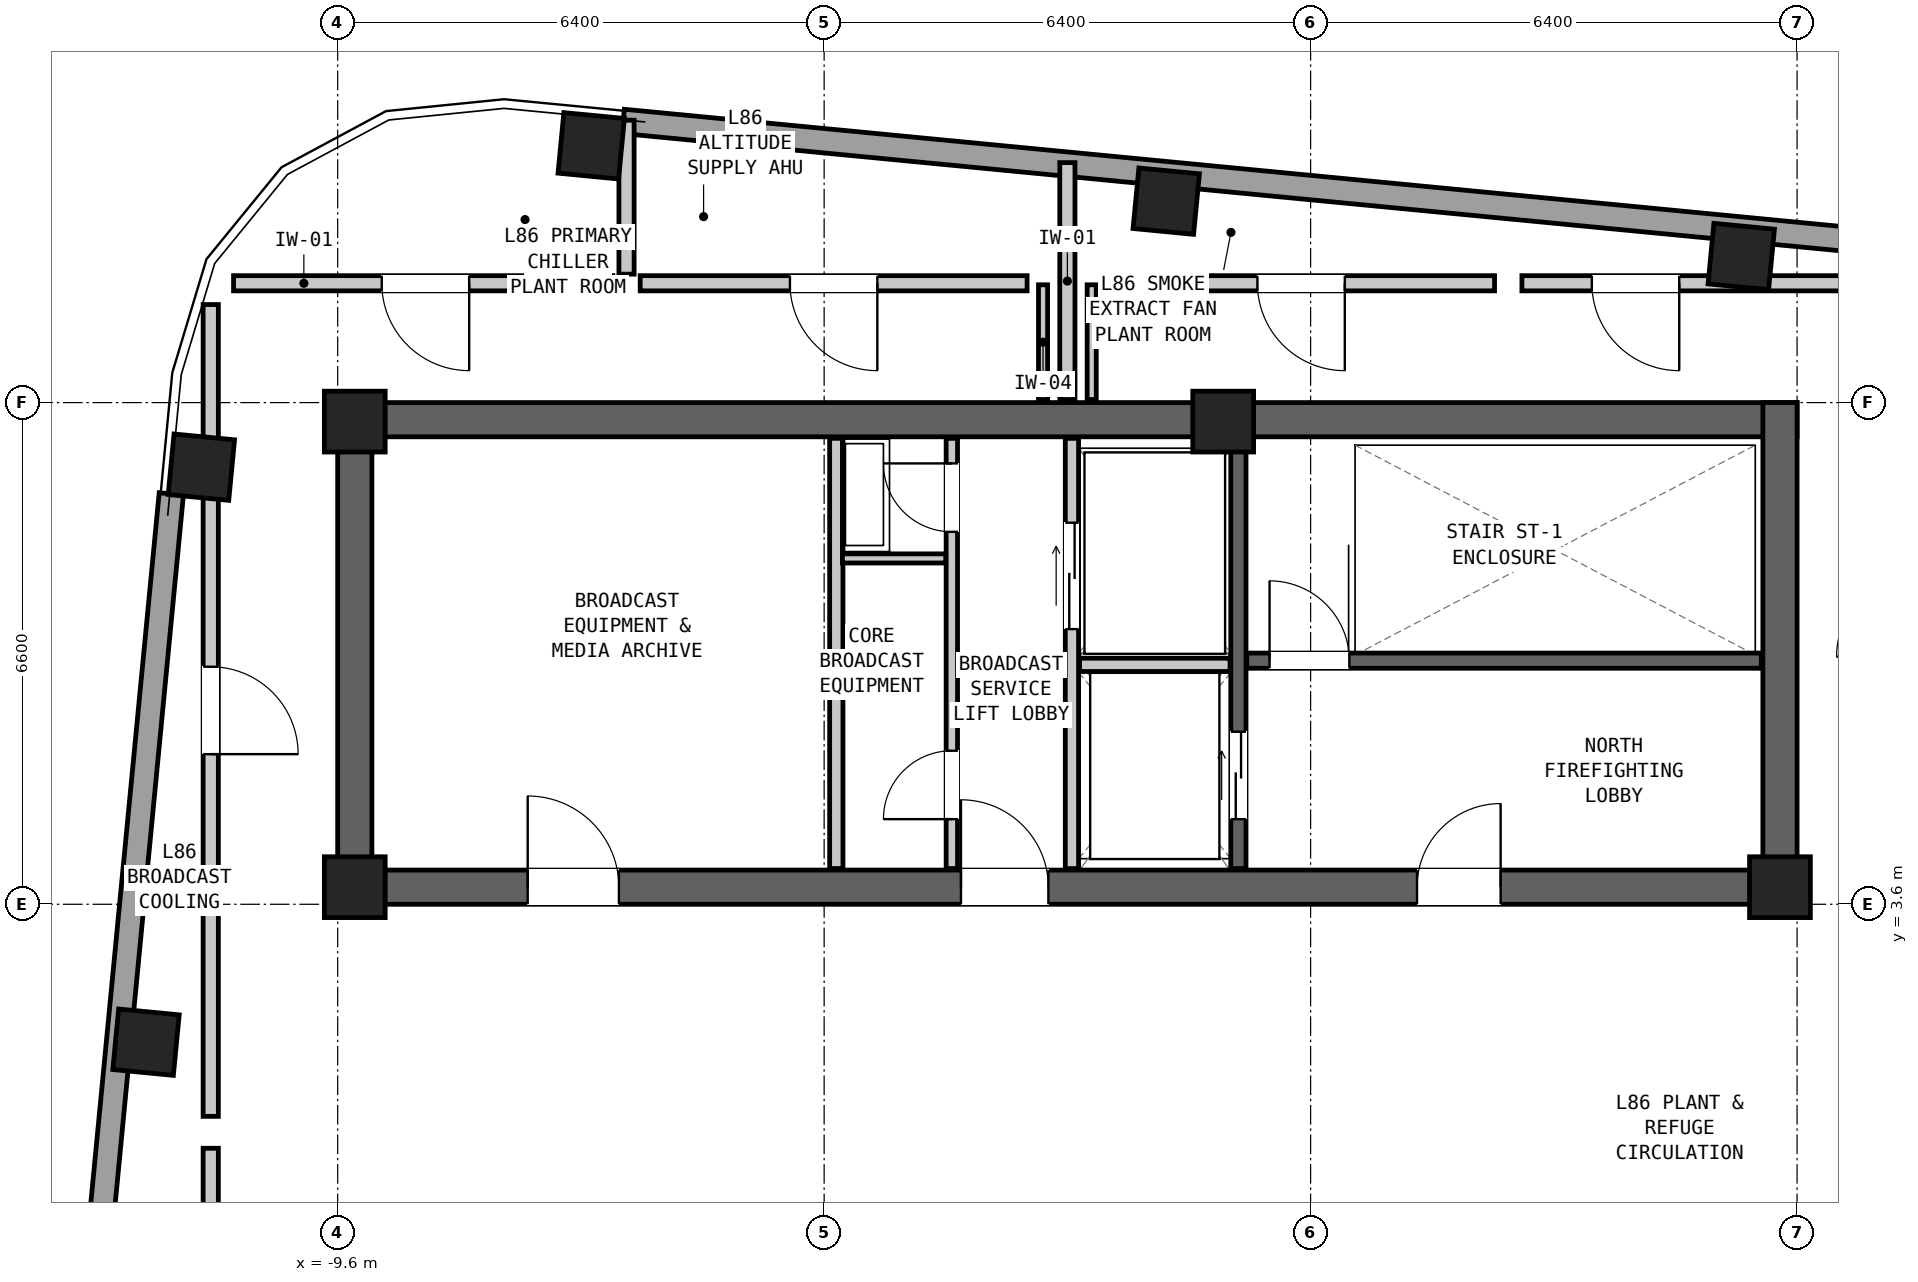
"""IFC4 building model, lengths in metres.
Left out: names, types, materials, properties, quantities, classifications, styles, units other than length and angle.
Written with IfcOpenShell. Run it as: python <this file> out.ifc"""

import sys

from ifc_helpers import new_model, si_unit, direction, frame, frame_2d, origin, origin_2d, place, context, subcontext, project, spatial, rectangle, extrude, element, fill, save


model = new_model("IFC4")
c1 = context("Model", 3, precision=1e-05, world=origin(), true_north=direction((0.0, 1.0)))
c2 = subcontext(c1, "Body", "Model", "MODEL_VIEW")
j1 = project(units=[si_unit("LENGTHUNIT", "METRE"), si_unit("PLANEANGLEUNIT", "RADIAN")], contexts=[c1])
p1 = place(None, origin())
s1 = spatial("IfcSite", under=j1, at=p1, CompositionType="ELEMENT")
p2 = place(p1, origin())
s2 = spatial("IfcBuilding", under=s1, at=p2, CompositionType="ELEMENT")
p3 = place(p2, frame((0.0, 0.0, 292.85)))
s3 = spatial("IfcBuildingStorey", under=s2, at=p3, CompositionType="ELEMENT", Elevation=292.85)
p4 = place(p3, frame((-9.6, 9.975, 0.0), z_axis=(0.0, 0.0, 1.0), x_axis=(1.0, 0.0, 0.0)))
e1 = element("IfcWall", 1, at=p4, inside=s3, PredefinedType="SHEAR", context=c2, shape_type="SweptSolid", body=[
    extrude(rectangle(XDim=19.2, YDim=0.45, at=frame_2d((9.6, 0.0))), origin(), (0.0, 0.0, 1.0), 3.9),
])
p5 = place(p3, frame((-9.6, 3.825, 0.0), z_axis=(0.0, 0.0, 1.0), x_axis=(1.0, 0.0, 0.0)))
e2 = element("IfcWall", 2, at=p5, inside=s3, PredefinedType="SHEAR", context=c2, shape_type="SweptSolid", body=[
    extrude(rectangle(XDim=19.2, YDim=0.45, at=frame_2d((9.6, 0.0))), origin(), (0.0, 0.0, 1.0), 3.9),
])
p6 = place(p5, frame((14.2, 0.0, 0.0)))
e3 = element("IfcOpeningElement", 3, at=p6, cuts=e2, PredefinedType="OPENING", context=c2, shape_type="SweptSolid", body=[
    extrude(rectangle(XDim=1.1, YDim=2.08, at=frame_2d((0.55, 1.04))), frame((0.0, 0.237, 0.0), z_axis=(0.0, -1.0, 0.0), x_axis=(1.0, 0.0, 0.0)), (0.0, 0.0, 1.0), 0.474),
])
p7 = place(p5, frame((8.2, 0.0, 0.0)))
e4 = element("IfcOpeningElement", 4, at=p7, cuts=e2, PredefinedType="OPENING", context=c2, shape_type="SweptSolid", body=[
    extrude(rectangle(XDim=1.15, YDim=2.1, at=frame_2d((0.575, 1.05))), frame((0.0, 0.237, 0.0), z_axis=(0.0, -1.0, 0.0), x_axis=(1.0, 0.0, 0.0)), (0.0, 0.0, 1.0), 0.474),
])
p8 = place(p5, frame((2.5, 0.0, 0.0)))
e5 = element("IfcOpeningElement", 5, at=p8, cuts=e2, PredefinedType="OPENING", context=c2, shape_type="SweptSolid", body=[
    extrude(rectangle(XDim=1.2, YDim=2.1, at=frame_2d((0.6, 1.05))), frame((0.0, 0.237, 0.0), z_axis=(0.0, -1.0, 0.0), x_axis=(1.0, 0.0, 0.0)), (0.0, 0.0, 1.0), 0.474),
])
for number, where, z_axis, x_axis in (
    (6, (-9.375, 3.6, 0.0), (0.0, 0.0, 1.0), (0.0, 1.0, 0.0)),
    (7, (9.375, 3.6, 0.0), (0.0, 0.0, 1.0), (0.0, 1.0, 0.0)),
):
    element("IfcWall", number, at=place(p3, frame(where, z_axis=z_axis, x_axis=x_axis)), inside=s3, PredefinedType="SHEAR", context=c2, shape_type="SweptSolid", body=[
        extrude(rectangle(XDim=6.6, YDim=0.45, at=frame_2d((3.3, 0.0))), origin(), (0.0, 0.0, 1.0), 3.9),
    ])
for number, where, z_axis, x_axis in (
    (8, (8.865, 12.122, 0.0), (0.0, 0.0, 1.0), (0.995, -0.096, 0.0)),
    (9, (1.301, 12.85, 0.0), (0.0, 0.0, 1.0), (0.995, -0.096, 0.0)),
    (10, (-6.264, 13.579, 0.0), (0.0, 0.0, 1.0), (0.995, -0.096, 0.0)),
    (11, (-11.393, 9.351, 0.0), (0.0, 0.0, 1.0), (0.096, 0.995, 0.0)),
    (12, (-12.122, 1.786, 0.0), (0.0, 0.0, 1.0), (0.096, 0.995, 0.0)),
    (13, (-9.375, 9.95, 0.0), (0.0, 0.0, 1.0), (1.0, 0.0, 0.0)),
    (14, (2.05, 9.95, 0.0), (0.0, 0.0, 1.0), (1.0, 0.0, 0.0)),
    (15, (-9.375, 3.825, 0.0), (0.0, 0.0, 1.0), (1.0, 0.0, 0.0)),
    (16, (9.375, 3.825, 0.0), (0.0, 0.0, 1.0), (1.0, 0.0, 0.0)),
):
    element("IfcColumn", number, at=place(p3, frame(where, z_axis=z_axis, x_axis=x_axis)), inside=s3, PredefinedType="COLUMN", context=c2, shape_type="SweptSolid", body=[
        extrude(rectangle(XDim=0.8, YDim=0.8, at=origin_2d()), origin(), (0.0, 0.0, 1.0), 3.9),
    ])
p9 = place(p3, frame((-5.844, 13.9, 0.0), z_axis=(0.0, 0.0, 1.0), x_axis=(0.995396489284, -0.095842731181, 0.0)))
e17 = element("IfcWall", 17, at=p9, inside=s3, PredefinedType="SOLIDWALL", context=c2, shape_type="SweptSolid", body=[
    extrude(rectangle(XDim=22.024, YDim=0.32, at=frame_2d((11.012, 0.0))), origin(), (0.0, 0.0, 1.0), 3.214),
])
p10 = place(p3, frame((-13.9, -12.924, 0.0), z_axis=(0.0, 0.0, 1.0), x_axis=(0.095843788738, 0.995396387456, 0.0)))
e18 = element("IfcWall", 18, at=p10, inside=s3, PredefinedType="SOLIDWALL", context=c2, shape_type="SweptSolid", body=[
    extrude(rectangle(XDim=22.024, YDim=0.32, at=frame_2d((11.012, 0.0))), origin(), (0.0, 0.0, 1.0), 3.214),
])
p11 = place(p3, frame((2.36, 6.805, 0.0), z_axis=(0.0, 0.0, 1.0), x_axis=(1.0, 0.0, 0.0)))
e19 = element("IfcWall", 19, at=p11, inside=s3, PredefinedType="SHEAR", context=c2, shape_type="SweptSolid", body=[
    extrude(rectangle(XDim=6.77, YDim=0.2, at=frame_2d((3.385, 0.0))), origin(), (0.0, 0.0, 1.0), 3.64),
])
p12 = place(p11, frame((0.3, 0.0, 0.0)))
e20 = element("IfcOpeningElement", 20, at=p12, cuts=e19, PredefinedType="OPENING", context=c2, shape_type="SweptSolid", body=[
    extrude(rectangle(XDim=1.05, YDim=2.08, at=frame_2d((0.525, 1.04))), frame((0.0, 0.112, 0.0), z_axis=(0.0, -1.0, 0.0), x_axis=(1.0, 0.0, 0.0)), (0.0, 0.0, 1.0), 0.224),
])
p13 = place(p3, frame((2.25, 4.07, 0.0), z_axis=(0.0, 0.0, 1.0), x_axis=(0.0, 1.0, 0.0)))
e21 = element("IfcWall", 21, at=p13, inside=s3, PredefinedType="SHEAR", context=c2, shape_type="SweptSolid", body=[
    extrude(rectangle(XDim=5.66, YDim=0.2, at=frame_2d((2.83, 0.0))), origin(), (0.0, 0.0, 1.0), 3.64),
])
p14 = place(p13, frame((0.65, 0.0, 0.0)))
e22 = element("IfcOpeningElement", 22, at=p14, cuts=e21, PredefinedType="OPENING", context=c2, shape_type="SweptSolid", body=[
    extrude(rectangle(XDim=1.15, YDim=2.08, at=frame_2d((0.575, 1.04))), frame((0.0, 0.112, 0.0), z_axis=(0.0, -1.0, 0.0), x_axis=(1.0, 0.0, 0.0)), (0.0, 0.0, 1.0), 0.224),
])
p15 = place(p3, frame((0.06, 4.07, 0.0), z_axis=(0.0, 0.0, 1.0), x_axis=(0.0, 1.0, 0.0)))
e23 = element("IfcWall", 23, at=p15, inside=s3, PredefinedType="PARTITIONING", context=c2, shape_type="SweptSolid", body=[
    extrude(rectangle(XDim=5.66, YDim=0.175, at=frame_2d((2.83, 0.0))), origin(), (0.0, 0.0, 1.0), 3.64),
])
p16 = place(p15, frame((3.15, 0.0, 0.0)))
e24 = element("IfcOpeningElement", 24, at=p16, cuts=e23, PredefinedType="OPENING", context=c2, shape_type="SweptSolid", body=[
    extrude(rectangle(XDim=1.4, YDim=2.12, at=frame_2d((0.7, 1.06))), frame((0.0, 0.1, 0.0), z_axis=(0.0, -1.0, 0.0), x_axis=(1.0, 0.0, 0.0)), (0.0, 0.0, 1.0), 0.199),
])
p17 = place(p3, frame((0.16, 6.75, 0.0), z_axis=(0.0, 0.0, 1.0), x_axis=(1.0, 0.0, 0.0)))
e25 = element("IfcWall", 25, at=p17, inside=s3, PredefinedType="PARTITIONING", context=c2, shape_type="SweptSolid", body=[
    extrude(rectangle(XDim=1.98, YDim=0.175, at=frame_2d((0.99, 0.0))), origin(), (0.0, 0.0, 1.0), 3.64),
])
p18 = place(p3, frame((-3.04, 4.07, 0.0), z_axis=(0.0, 0.0, 1.0), x_axis=(0.0, 1.0, 0.0)))
e26 = element("IfcWall", 26, at=p18, inside=s3, PredefinedType="PARTITIONING", context=c2, shape_type="SweptSolid", body=[
    extrude(rectangle(XDim=5.66, YDim=0.175, at=frame_2d((2.83, 0.0))), origin(), (0.0, 0.0, 1.0), 3.64),
])
p19 = place(p3, frame((-1.52, 4.07, 0.0), z_axis=(0.0, 0.0, 1.0), x_axis=(0.0, 1.0, 0.0)))
e27 = element("IfcWall", 27, at=p19, inside=s3, PredefinedType="PARTITIONING", context=c2, shape_type="SweptSolid", body=[
    extrude(rectangle(XDim=5.66, YDim=0.15, at=frame_2d((2.83, 0.0))), origin(), (0.0, 0.0, 1.0), 3.64),
])
p20 = place(p19, frame((4.43, 0.0, 0.0)))
e28 = element("IfcOpeningElement", 28, at=p20, cuts=e27, PredefinedType="OPENING", context=c2, shape_type="SweptSolid", body=[
    extrude(rectangle(XDim=0.9, YDim=2.05, at=frame_2d((0.45, 1.025))), frame((0.0, 0.087, 0.0), z_axis=(0.0, -1.0, 0.0), x_axis=(1.0, 0.0, 0.0)), (0.0, 0.0, 1.0), 0.174),
])
p21 = place(p19, frame((0.65, 0.0, 0.0)))
e29 = element("IfcOpeningElement", 29, at=p21, cuts=e27, PredefinedType="OPENING", context=c2, shape_type="SweptSolid", body=[
    extrude(rectangle(XDim=0.9, YDim=2.05, at=frame_2d((0.45, 1.025))), frame((0.0, 0.087, 0.0), z_axis=(0.0, -1.0, 0.0), x_axis=(1.0, 0.0, 0.0)), (0.0, 0.0, 1.0), 0.174),
])
p22 = place(p3, frame((-2.96, 8.15, 0.0), z_axis=(0.0, 0.0, 1.0), x_axis=(1.0, 0.0, 0.0)))
e30 = element("IfcWall", 30, at=p22, inside=s3, PredefinedType="PARTITIONING", context=c2, shape_type="SweptSolid", body=[
    extrude(rectangle(XDim=1.36, YDim=0.12, at=frame_2d((0.68, 0.0))), origin(), (0.0, 0.0, 1.0), 3.64),
])
p23 = place(p3, frame((0.0, 10.24, 0.0), z_axis=(0.0, 0.0, 1.0), x_axis=(0.0, 1.0, 0.0)))
e31 = element("IfcWall", 31, at=p23, inside=s3, PredefinedType="PARTITIONING", context=c2, shape_type="SweptSolid", body=[
    extrude(rectangle(XDim=3.117, YDim=0.2, at=frame_2d((1.559, 0.0))), origin(), (0.0, 0.0, 1.0), 3.161),
])
for number, where, z_axis, x_axis in (
    (32, (-0.32, 10.24, 0.0), (0.0, 0.0, 1.0), (0.0, 1.0, 0.0)),
    (33, (0.32, 10.24, 0.0), (0.0, 0.0, 1.0), (0.0, 1.0, 0.0)),
):
    element("IfcWall", number, at=place(p3, frame(where, z_axis=z_axis, x_axis=x_axis)), inside=s3, PredefinedType="PARTITIONING", context=c2, shape_type="SweptSolid", body=[
        extrude(rectangle(XDim=1.51, YDim=0.12, at=frame_2d((0.755, 0.0))), origin(), (0.0, 0.0, 1.0), 3.161),
    ])
p24 = place(p3, frame((-5.98, 11.77, 0.0), z_axis=(0.0, 0.0, 1.0), x_axis=(-1.0, 0.0, 0.0)))
e34 = element("IfcWall", 34, at=p24, inside=s3, PredefinedType="PARTITIONING", context=c2, shape_type="SweptSolid", body=[
    extrude(rectangle(XDim=4.99, YDim=0.2, at=frame_2d((2.495, 0.0))), origin(), (0.0, 0.0, 1.0), 3.64),
])
p25 = place(p24, frame((1.89, 0.0, 0.0)))
e35 = element("IfcOpeningElement", 35, at=p25, cuts=e34, PredefinedType="OPENING", context=c2, shape_type="SweptSolid", body=[
    extrude(rectangle(XDim=1.15, YDim=2.1, at=frame_2d((0.575, 1.05))), frame((0.0, 0.112, 0.0), z_axis=(0.0, -1.0, 0.0), x_axis=(1.0, 0.0, 0.0)), (0.0, 0.0, 1.0), 0.224),
])
p26 = place(p3, frame((-5.8, 11.89, 0.0), z_axis=(0.0, 0.0, 1.0), x_axis=(0.0, 1.0, 0.0)))
e36 = element("IfcWall", 36, at=p26, inside=s3, PredefinedType="PARTITIONING", context=c2, shape_type="SweptSolid", body=[
    extrude(rectangle(XDim=2.026, YDim=0.2, at=frame_2d((1.013, 0.0))), origin(), (0.0, 0.0, 1.0), 3.161),
])
p27 = place(p3, frame((-0.53, 11.77, 0.0), z_axis=(0.0, 0.0, 1.0), x_axis=(-1.0, 0.0, 0.0)))
e37 = element("IfcWall", 37, at=p27, inside=s3, PredefinedType="PARTITIONING", context=c2, shape_type="SweptSolid", body=[
    extrude(rectangle(XDim=5.09, YDim=0.2, at=frame_2d((2.545, 0.0))), origin(), (0.0, 0.0, 1.0), 3.64),
])
p28 = place(p27, frame((1.97, 0.0, 0.0)))
e38 = element("IfcOpeningElement", 38, at=p28, cuts=e37, PredefinedType="OPENING", context=c2, shape_type="SweptSolid", body=[
    extrude(rectangle(XDim=1.15, YDim=2.1, at=frame_2d((0.575, 1.05))), frame((0.0, 0.112, 0.0), z_axis=(0.0, -1.0, 0.0), x_axis=(1.0, 0.0, 0.0)), (0.0, 0.0, 1.0), 0.224),
])
p29 = place(p3, frame((5.62, 11.77, 0.0), z_axis=(0.0, 0.0, 1.0), x_axis=(-1.0, 0.0, 0.0)))
e39 = element("IfcWall", 39, at=p29, inside=s3, PredefinedType="PARTITIONING", context=c2, shape_type="SweptSolid", body=[
    extrude(rectangle(XDim=5.09, YDim=0.2, at=frame_2d((2.545, 0.0))), origin(), (0.0, 0.0, 1.0), 3.64),
])
p30 = place(p29, frame((1.97, 0.0, 0.0)))
e40 = element("IfcOpeningElement", 40, at=p30, cuts=e39, PredefinedType="OPENING", context=c2, shape_type="SweptSolid", body=[
    extrude(rectangle(XDim=1.15, YDim=2.1, at=frame_2d((0.575, 1.05))), frame((0.0, 0.112, 0.0), z_axis=(0.0, -1.0, 0.0), x_axis=(1.0, 0.0, 0.0)), (0.0, 0.0, 1.0), 0.224),
])
p31 = place(p3, frame((10.97, 11.77, 0.0), z_axis=(0.0, 0.0, 1.0), x_axis=(-1.0, 0.0, 0.0)))
e41 = element("IfcWall", 41, at=p31, inside=s3, PredefinedType="PARTITIONING", context=c2, shape_type="SweptSolid", body=[
    extrude(rectangle(XDim=4.99, YDim=0.2, at=frame_2d((2.495, 0.0))), origin(), (0.0, 0.0, 1.0), 3.214),
])
p32 = place(p31, frame((2.92, 0.0, 0.0)))
e42 = element("IfcOpeningElement", 42, at=p32, cuts=e41, PredefinedType="OPENING", context=c2, shape_type="SweptSolid", body=[
    extrude(rectangle(XDim=1.15, YDim=2.1, at=frame_2d((0.575, 1.05))), frame((0.0, 0.112, 0.0), z_axis=(0.0, -1.0, 0.0), x_axis=(1.0, 0.0, 0.0)), (0.0, 0.0, 1.0), 0.224),
])
p33 = place(p3, frame((-11.27, 0.39, 0.0), z_axis=(0.0, 0.0, 1.0), x_axis=(0.0, -1.0, 0.0)))
e43 = element("IfcWall", 43, at=p33, inside=s3, PredefinedType="PARTITIONING", context=c2, shape_type="SweptSolid", body=[
    extrude(rectangle(XDim=10.68, YDim=0.2, at=frame_2d((5.34, 0.0))), origin(), (0.0, 0.0, 1.0), 3.64),
])
p34 = place(p33, frame((1.561, 0.0, 0.0)))
e44 = element("IfcOpeningElement", 44, at=p34, cuts=e43, PredefinedType="OPENING", context=c2, shape_type="SweptSolid", body=[
    extrude(rectangle(XDim=1.15, YDim=2.1, at=frame_2d((0.575, 1.05))), frame((0.0, 0.112, 0.0), z_axis=(0.0, -1.0, 0.0), x_axis=(1.0, 0.0, 0.0)), (0.0, 0.0, 1.0), 0.224),
])
p35 = place(p3, frame((-11.27, 11.49, 0.0), z_axis=(0.0, 0.0, 1.0), x_axis=(0.0, -1.0, 0.0)))
e45 = element("IfcWall", 45, at=p35, inside=s3, PredefinedType="PARTITIONING", context=c2, shape_type="SweptSolid", body=[
    extrude(rectangle(XDim=10.68, YDim=0.2, at=frame_2d((5.34, 0.0))), origin(), (0.0, 0.0, 1.0), 3.214),
])
p36 = place(p35, frame((4.765, 0.0, 0.0)))
e46 = element("IfcOpeningElement", 46, at=p36, cuts=e45, PredefinedType="OPENING", context=c2, shape_type="SweptSolid", body=[
    extrude(rectangle(XDim=1.15, YDim=2.1, at=frame_2d((0.575, 1.05))), frame((0.0, 0.112, 0.0), z_axis=(0.0, -1.0, 0.0), x_axis=(1.0, 0.0, 0.0)), (0.0, 0.0, 1.0), 0.224),
])
p37 = place(p12, origin())
e47 = element("IfcDoor", 47, at=p37, inside=s3, OperationType="SINGLE_SWING_LEFT", PredefinedType="DOOR", context=c2, shape_type="SweptSolid", body=[
    extrude(rectangle(XDim=1.05, YDim=2.08, at=frame_2d((0.525, 1.04))), frame((0.0, 0.025, 0.0), z_axis=(0.0, -1.0, 0.0), x_axis=(1.0, 0.0, 0.0)), (0.0, 0.0, 1.0), 0.05),
])
fill(e20, e47)
p38 = place(p6, origin())
e48 = element("IfcDoor", 48, at=p38, inside=s3, OperationType="SINGLE_SWING_RIGHT", PredefinedType="DOOR", context=c2, shape_type="SweptSolid", body=[
    extrude(rectangle(XDim=1.1, YDim=2.08, at=frame_2d((0.55, 1.04))), frame((0.0, 0.025, 0.0), z_axis=(0.0, -1.0, 0.0), x_axis=(1.0, 0.0, 0.0)), (0.0, 0.0, 1.0), 0.05),
])
fill(e3, e48)
p39 = place(p14, origin())
e49 = element("IfcDoor", 49, at=p39, inside=s3, OperationType="DOUBLE_DOOR_SLIDING", PredefinedType="DOOR", context=c2, shape_type="SweptSolid", body=[
    extrude(rectangle(XDim=1.15, YDim=2.08, at=frame_2d((0.575, 1.04))), frame((0.0, 0.025, 0.0), z_axis=(0.0, -1.0, 0.0), x_axis=(1.0, 0.0, 0.0)), (0.0, 0.0, 1.0), 0.05),
])
fill(e22, e49)
p40 = place(p16, origin())
e50 = element("IfcDoor", 50, at=p40, inside=s3, OperationType="DOUBLE_DOOR_SLIDING", PredefinedType="DOOR", context=c2, shape_type="SweptSolid", body=[
    extrude(rectangle(XDim=1.4, YDim=2.12, at=frame_2d((0.7, 1.06))), frame((0.0, 0.025, 0.0), z_axis=(0.0, -1.0, 0.0), x_axis=(1.0, 0.0, 0.0)), (0.0, 0.0, 1.0), 0.05),
])
fill(e24, e50)
p41 = place(p7, origin())
e51 = element("IfcDoor", 51, at=p41, inside=s3, OperationType="SINGLE_SWING_LEFT", PredefinedType="DOOR", context=c2, shape_type="SweptSolid", body=[
    extrude(rectangle(XDim=1.15, YDim=2.1, at=frame_2d((0.575, 1.05))), frame((0.0, 0.025, 0.0), z_axis=(0.0, -1.0, 0.0), x_axis=(1.0, 0.0, 0.0)), (0.0, 0.0, 1.0), 0.05),
])
fill(e4, e51)
p42 = place(p20, origin())
e52 = element("IfcDoor", 52, at=p42, inside=s3, OperationType="SINGLE_SWING_RIGHT", PredefinedType="DOOR", context=c2, shape_type="SweptSolid", body=[
    extrude(rectangle(XDim=0.9, YDim=2.05, at=frame_2d((0.45, 1.025))), frame((0.0, 0.025, 0.0), z_axis=(0.0, -1.0, 0.0), x_axis=(1.0, 0.0, 0.0)), (0.0, 0.0, 1.0), 0.05),
])
fill(e28, e52)
p43 = place(p21, origin())
e53 = element("IfcDoor", 53, at=p43, inside=s3, OperationType="SINGLE_SWING_LEFT", PredefinedType="DOOR", context=c2, shape_type="SweptSolid", body=[
    extrude(rectangle(XDim=0.9, YDim=2.05, at=frame_2d((0.45, 1.025))), frame((0.0, 0.025, 0.0), z_axis=(0.0, -1.0, 0.0), x_axis=(1.0, 0.0, 0.0)), (0.0, 0.0, 1.0), 0.05),
])
fill(e29, e53)
p44 = place(p8, origin())
e54 = element("IfcDoor", 54, at=p44, inside=s3, OperationType="SINGLE_SWING_LEFT", PredefinedType="DOOR", context=c2, shape_type="SweptSolid", body=[
    extrude(rectangle(XDim=1.2, YDim=2.1, at=frame_2d((0.6, 1.05))), frame((0.0, 0.025, 0.0), z_axis=(0.0, -1.0, 0.0), x_axis=(1.0, 0.0, 0.0)), (0.0, 0.0, 1.0), 0.05),
])
fill(e5, e54)
p45 = place(p25, origin())
e55 = element("IfcDoor", 55, at=p45, inside=s3, OperationType="SINGLE_SWING_LEFT", PredefinedType="DOOR", context=c2, shape_type="SweptSolid", body=[
    extrude(rectangle(XDim=1.15, YDim=2.1, at=frame_2d((0.575, 1.05))), frame((0.0, 0.025, 0.0), z_axis=(0.0, -1.0, 0.0), x_axis=(1.0, 0.0, 0.0)), (0.0, 0.0, 1.0), 0.05),
])
fill(e35, e55)
p46 = place(p28, origin())
e56 = element("IfcDoor", 56, at=p46, inside=s3, OperationType="SINGLE_SWING_LEFT", PredefinedType="DOOR", context=c2, shape_type="SweptSolid", body=[
    extrude(rectangle(XDim=1.15, YDim=2.1, at=frame_2d((0.575, 1.05))), frame((0.0, 0.025, 0.0), z_axis=(0.0, -1.0, 0.0), x_axis=(1.0, 0.0, 0.0)), (0.0, 0.0, 1.0), 0.05),
])
fill(e38, e56)
p47 = place(p30, origin())
e57 = element("IfcDoor", 57, at=p47, inside=s3, OperationType="SINGLE_SWING_LEFT", PredefinedType="DOOR", context=c2, shape_type="SweptSolid", body=[
    extrude(rectangle(XDim=1.15, YDim=2.1, at=frame_2d((0.575, 1.05))), frame((0.0, 0.025, 0.0), z_axis=(0.0, -1.0, 0.0), x_axis=(1.0, 0.0, 0.0)), (0.0, 0.0, 1.0), 0.05),
])
fill(e40, e57)
p48 = place(p32, origin())
e58 = element("IfcDoor", 58, at=p48, inside=s3, OperationType="SINGLE_SWING_LEFT", PredefinedType="DOOR", context=c2, shape_type="SweptSolid", body=[
    extrude(rectangle(XDim=1.15, YDim=2.1, at=frame_2d((0.575, 1.05))), frame((0.0, 0.025, 0.0), z_axis=(0.0, -1.0, 0.0), x_axis=(1.0, 0.0, 0.0)), (0.0, 0.0, 1.0), 0.05),
])
fill(e42, e58)
p49 = place(p36, origin())
e59 = element("IfcDoor", 59, at=p49, inside=s3, OperationType="SINGLE_SWING_RIGHT", PredefinedType="DOOR", context=c2, shape_type="SweptSolid", body=[
    extrude(rectangle(XDim=1.15, YDim=2.1, at=frame_2d((0.575, 1.05))), frame((0.0, 0.025, 0.0), z_axis=(0.0, -1.0, 0.0), x_axis=(1.0, 0.0, 0.0)), (0.0, 0.0, 1.0), 0.05),
])
fill(e46, e59)
save(model, sys.argv[1])
